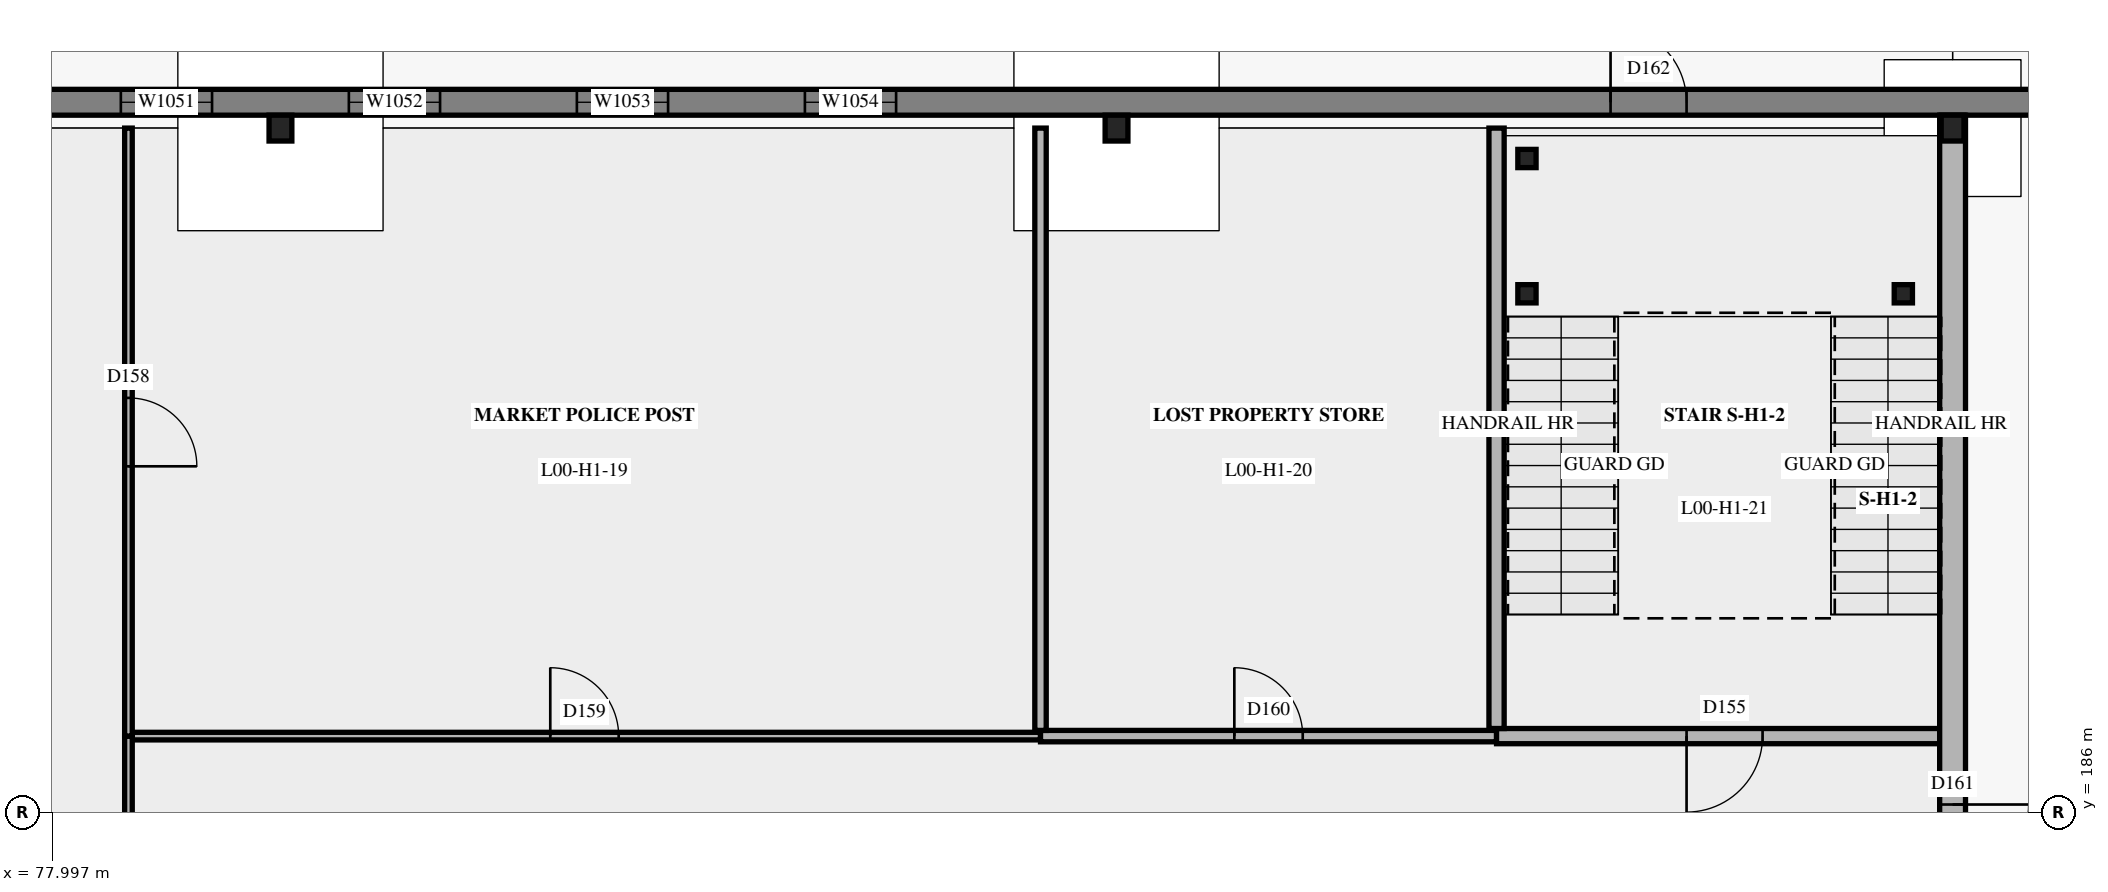
"""IFC4 building model, lengths in metres.
Left out: names, types, materials, properties, quantities, classifications, styles, units other than length and angle.
Written with IfcOpenShell. Run it as: python <this file> out.ifc"""

import sys

from ifc_helpers import new_model, si_unit, direction, frame, frame_2d, origin, origin_2d, place, context, subcontext, project, spatial, rectangle, i_section, extrude, element, fill, save


model = new_model("IFC4")
c1 = context("Model", 3, precision=1e-05, world=origin(), true_north=direction((0.0, 1.0)))
c2 = subcontext(c1, "Body", "Model", "MODEL_VIEW")
j1 = project(units=[si_unit("LENGTHUNIT", "METRE"), si_unit("PLANEANGLEUNIT", "RADIAN")], contexts=[c1])
p1 = place(None, origin())
s1 = spatial("IfcSite", under=j1, at=p1, CompositionType="ELEMENT")
p2 = place(p1, origin())
s2 = spatial("IfcBuilding", under=s1, at=p2, CompositionType="ELEMENT")
p3 = place(p2, origin())
s3 = spatial("IfcBuildingStorey", under=s2, at=p3, CompositionType="ELEMENT", Elevation=0.0)
for number, where, z_axis, x_axis in (
    (1, (81.0, 195.0, 0.0), (0.0, 0.0, 1.0), (1.0, 0.0, 0.0)),
    (2, (92.0, 195.0, 0.0), (0.0, 0.0, 1.0), (1.0, 0.0, 0.0)),
    (3, (103.0, 195.0, 0.0), (0.0, 0.0, 1.0), (1.0, 0.0, 0.0)),
):
    element("IfcColumn", number, at=place(p3, frame(where, z_axis=z_axis, x_axis=x_axis)), inside=s3, PredefinedType="COLUMN", context=c2, shape_type="SweptSolid", body=[
        extrude(i_section(OverallWidth=0.3, OverallDepth=0.34, WebThickness=0.012, FlangeThickness=0.021, at=origin_2d()), origin(), (0.0, 0.0, 1.0), 4.65),
    ])
p4 = place(p3, frame((30.0, 195.34, 0.0), z_axis=(0.0, 0.0, 1.0), x_axis=(1.0, 0.0, 0.0)))
e4 = element("IfcWall", 4, at=p4, inside=s3, PredefinedType="SOLIDWALL", context=c2, shape_type="SweptSolid", body=[
    extrude(rectangle(XDim=80.0, YDim=0.34, at=frame_2d((40.0, 0.0))), origin(), (0.0, 0.0, 1.0), 5.4),
])
p5 = place(p4, frame((42.5, 0.0, 0.0)))
e5 = element("IfcOpeningElement", 5, at=p5, cuts=e4, PredefinedType="OPENING", context=c2, shape_type="SweptSolid", body=[
    extrude(rectangle(XDim=1.8, YDim=2.1, at=frame_2d((0.9, 1.05))), frame((0.0, 0.18, 0.0), z_axis=(0.0, -1.0, 0.0), x_axis=(1.0, 0.0, 0.0)), (0.0, 0.0, 1.0), 0.36),
])
p6 = place(p4, frame((34.5, 0.0, 0.0)))
e6 = element("IfcOpeningElement", 6, at=p6, cuts=e4, PredefinedType="OPENING", context=c2, shape_type="SweptSolid", body=[
    extrude(rectangle(XDim=1.0, YDim=2.1, at=frame_2d((0.5, 1.05))), frame((0.0, 0.18, 0.0), z_axis=(0.0, -1.0, 0.0), x_axis=(1.0, 0.0, 0.0)), (0.0, 0.0, 1.0), 0.36),
])
p7 = place(p4, frame((68.5, 0.0, 0.0)))
e7 = element("IfcOpeningElement", 7, at=p7, cuts=e4, PredefinedType="OPENING", context=c2, shape_type="SweptSolid", body=[
    extrude(rectangle(XDim=1.0, YDim=2.1, at=frame_2d((0.5, 1.05))), frame((0.0, 0.18, 0.0), z_axis=(0.0, -1.0, 0.0), x_axis=(1.0, 0.0, 0.0)), (0.0, 0.0, 1.0), 0.36),
])
p8 = place(p4, frame((0.9, 0.0, 0.9)))
e8 = element("IfcOpeningElement", 8, at=p8, cuts=e4, PredefinedType="OPENING", context=c2, shape_type="SweptSolid", body=[
    extrude(rectangle(XDim=1.2, YDim=3.3, at=frame_2d((0.6, 1.65))), frame((0.0, 0.18, 0.0), z_axis=(0.0, -1.0, 0.0), x_axis=(1.0, 0.0, 0.0)), (0.0, 0.0, 1.0), 0.36),
])
p9 = place(p4, frame((3.9, 0.0, 0.9)))
e9 = element("IfcOpeningElement", 9, at=p9, cuts=e4, PredefinedType="OPENING", context=c2, shape_type="SweptSolid", body=[
    extrude(rectangle(XDim=1.2, YDim=3.3, at=frame_2d((0.6, 1.65))), frame((0.0, 0.18, 0.0), z_axis=(0.0, -1.0, 0.0), x_axis=(1.0, 0.0, 0.0)), (0.0, 0.0, 1.0), 0.36),
])
p10 = place(p4, frame((18.9, 0.0, 0.9)))
e10 = element("IfcOpeningElement", 10, at=p10, cuts=e4, PredefinedType="OPENING", context=c2, shape_type="SweptSolid", body=[
    extrude(rectangle(XDim=1.2, YDim=3.3, at=frame_2d((0.6, 1.65))), frame((0.0, 0.18, 0.0), z_axis=(0.0, -1.0, 0.0), x_axis=(1.0, 0.0, 0.0)), (0.0, 0.0, 1.0), 0.36),
])
p11 = place(p4, frame((21.9, 0.0, 0.9)))
e11 = element("IfcOpeningElement", 11, at=p11, cuts=e4, PredefinedType="OPENING", context=c2, shape_type="SweptSolid", body=[
    extrude(rectangle(XDim=1.2, YDim=3.3, at=frame_2d((0.6, 1.65))), frame((0.0, 0.18, 0.0), z_axis=(0.0, -1.0, 0.0), x_axis=(1.0, 0.0, 0.0)), (0.0, 0.0, 1.0), 0.36),
])
p12 = place(p4, frame((24.9, 0.0, 0.9)))
e12 = element("IfcOpeningElement", 12, at=p12, cuts=e4, PredefinedType="OPENING", context=c2, shape_type="SweptSolid", body=[
    extrude(rectangle(XDim=1.2, YDim=3.3, at=frame_2d((0.6, 1.65))), frame((0.0, 0.18, 0.0), z_axis=(0.0, -1.0, 0.0), x_axis=(1.0, 0.0, 0.0)), (0.0, 0.0, 1.0), 0.36),
])
p13 = place(p4, frame((30.9, 0.0, 0.9)))
e13 = element("IfcOpeningElement", 13, at=p13, cuts=e4, PredefinedType="OPENING", context=c2, shape_type="SweptSolid", body=[
    extrude(rectangle(XDim=1.2, YDim=3.3, at=frame_2d((0.6, 1.65))), frame((0.0, 0.18, 0.0), z_axis=(0.0, -1.0, 0.0), x_axis=(1.0, 0.0, 0.0)), (0.0, 0.0, 1.0), 0.36),
])
p14 = place(p4, frame((36.9, 0.0, 0.9)))
e14 = element("IfcOpeningElement", 14, at=p14, cuts=e4, PredefinedType="OPENING", context=c2, shape_type="SweptSolid", body=[
    extrude(rectangle(XDim=1.2, YDim=3.3, at=frame_2d((0.6, 1.65))), frame((0.0, 0.18, 0.0), z_axis=(0.0, -1.0, 0.0), x_axis=(1.0, 0.0, 0.0)), (0.0, 0.0, 1.0), 0.36),
])
p15 = place(p4, frame((45.9, 0.0, 0.9)))
e15 = element("IfcOpeningElement", 15, at=p15, cuts=e4, PredefinedType="OPENING", context=c2, shape_type="SweptSolid", body=[
    extrude(rectangle(XDim=1.2, YDim=3.3, at=frame_2d((0.6, 1.65))), frame((0.0, 0.18, 0.0), z_axis=(0.0, -1.0, 0.0), x_axis=(1.0, 0.0, 0.0)), (0.0, 0.0, 1.0), 0.36),
])
p16 = place(p4, frame((48.9, 0.0, 0.9)))
e16 = element("IfcOpeningElement", 16, at=p16, cuts=e4, PredefinedType="OPENING", context=c2, shape_type="SweptSolid", body=[
    extrude(rectangle(XDim=1.2, YDim=3.3, at=frame_2d((0.6, 1.65))), frame((0.0, 0.18, 0.0), z_axis=(0.0, -1.0, 0.0), x_axis=(1.0, 0.0, 0.0)), (0.0, 0.0, 1.0), 0.36),
])
p17 = place(p4, frame((51.9, 0.0, 0.9)))
e17 = element("IfcOpeningElement", 17, at=p17, cuts=e4, PredefinedType="OPENING", context=c2, shape_type="SweptSolid", body=[
    extrude(rectangle(XDim=1.2, YDim=3.3, at=frame_2d((0.6, 1.65))), frame((0.0, 0.18, 0.0), z_axis=(0.0, -1.0, 0.0), x_axis=(1.0, 0.0, 0.0)), (0.0, 0.0, 1.0), 0.36),
])
p18 = place(p4, frame((54.9, 0.0, 0.9)))
e18 = element("IfcOpeningElement", 18, at=p18, cuts=e4, PredefinedType="OPENING", context=c2, shape_type="SweptSolid", body=[
    extrude(rectangle(XDim=1.2, YDim=3.3, at=frame_2d((0.6, 1.65))), frame((0.0, 0.18, 0.0), z_axis=(0.0, -1.0, 0.0), x_axis=(1.0, 0.0, 0.0)), (0.0, 0.0, 1.0), 0.36),
])
p19 = place(p4, frame((57.9, 0.0, 0.9)))
e19 = element("IfcOpeningElement", 19, at=p19, cuts=e4, PredefinedType="OPENING", context=c2, shape_type="SweptSolid", body=[
    extrude(rectangle(XDim=1.2, YDim=3.3, at=frame_2d((0.6, 1.65))), frame((0.0, 0.18, 0.0), z_axis=(0.0, -1.0, 0.0), x_axis=(1.0, 0.0, 0.0)), (0.0, 0.0, 1.0), 0.36),
])
p20 = place(p4, frame((75.9, 0.0, 0.9)))
e20 = element("IfcOpeningElement", 20, at=p20, cuts=e4, PredefinedType="OPENING", context=c2, shape_type="SweptSolid", body=[
    extrude(rectangle(XDim=1.2, YDim=3.3, at=frame_2d((0.6, 1.65))), frame((0.0, 0.18, 0.0), z_axis=(0.0, -1.0, 0.0), x_axis=(1.0, 0.0, 0.0)), (0.0, 0.0, 1.0), 0.36),
])
p21 = place(p3, frame((79.05, 187.0, 0.0), z_axis=(0.0, 0.0, 1.0), x_axis=(1.0, 0.0, 0.0)))
e21 = element("IfcWall", 21, at=p21, inside=s3, PredefinedType="PARTITIONING", context=c2, shape_type="SweptSolid", body=[
    extrude(rectangle(XDim=11.95, YDim=0.1, at=frame_2d((5.975, 0.0))), origin(), (0.0, 0.0, 1.0), 5.15),
])
p22 = place(p21, frame((5.5, 0.0, 0.0)))
e22 = element("IfcOpeningElement", 22, at=p22, cuts=e21, PredefinedType="OPENING", context=c2, shape_type="SweptSolid", body=[
    extrude(rectangle(XDim=0.9, YDim=2.1, at=frame_2d((0.45, 1.05))), frame((0.0, 0.06, 0.0), z_axis=(0.0, -1.0, 0.0), x_axis=(1.0, 0.0, 0.0)), (0.0, 0.0, 1.0), 0.12),
])
p23 = place(p3, frame((91.0, 187.0, 0.0), z_axis=(0.0, 0.0, 1.0), x_axis=(1.0, 0.0, 0.0)))
e23 = element("IfcWall", 23, at=p23, inside=s3, PredefinedType="PARTITIONING", context=c2, shape_type="SweptSolid", body=[
    extrude(rectangle(XDim=6.0, YDim=0.15, at=frame_2d((3.0, 0.0))), origin(), (0.0, 0.0, 1.0), 5.15),
])
p24 = place(p23, frame((2.55, 0.0, 0.0)))
e24 = element("IfcOpeningElement", 24, at=p24, cuts=e23, PredefinedType="OPENING", context=c2, shape_type="SweptSolid", body=[
    extrude(rectangle(XDim=0.9, YDim=2.1, at=frame_2d((0.45, 1.05))), frame((0.0, 0.085, 0.0), z_axis=(0.0, -1.0, 0.0), x_axis=(1.0, 0.0, 0.0)), (0.0, 0.0, 1.0), 0.17),
])
p25 = place(p3, frame((97.0, 187.0, 0.0), z_axis=(0.0, 0.0, 1.0), x_axis=(1.0, 0.0, 0.0)))
e25 = element("IfcWall", 25, at=p25, inside=s3, PredefinedType="PARTITIONING", context=c2, shape_type="SweptSolid", body=[
    extrude(rectangle(XDim=6.0, YDim=0.2, at=frame_2d((3.0, 0.0))), origin(), (0.0, 0.0, 1.0), 5.15),
])
p26 = place(p25, frame((2.5, 0.0, 0.0)))
e26 = element("IfcOpeningElement", 26, at=p26, cuts=e25, PredefinedType="OPENING", context=c2, shape_type="SweptSolid", body=[
    extrude(rectangle(XDim=1.0, YDim=2.1, at=frame_2d((0.5, 1.05))), frame((0.0, 0.11, 0.0), z_axis=(0.0, -1.0, 0.0), x_axis=(1.0, 0.0, 0.0)), (0.0, 0.0, 1.0), 0.22),
])
p27 = place(p3, frame((79.0, 181.0, 0.0), z_axis=(0.0, 0.0, 1.0), x_axis=(0.0, 1.0, 0.0)))
e27 = element("IfcWall", 27, at=p27, inside=s3, PredefinedType="PARTITIONING", context=c2, shape_type="SweptSolid", body=[
    extrude(rectangle(XDim=6.0, YDim=0.1, at=frame_2d((3.0, 0.0))), origin(), (0.0, 0.0, 1.0), 5.15),
])
p28 = place(p27, frame((2.1, 0.0, 0.0)))
e28 = element("IfcOpeningElement", 28, at=p28, cuts=e27, PredefinedType="OPENING", context=c2, shape_type="SweptSolid", body=[
    extrude(rectangle(XDim=1.8, YDim=2.1, at=frame_2d((0.9, 1.05))), frame((0.0, 0.06, 0.0), z_axis=(0.0, -1.0, 0.0), x_axis=(1.0, 0.0, 0.0)), (0.0, 0.0, 1.0), 0.12),
])
p29 = place(p3, frame((79.0, 187.0, 0.0), z_axis=(0.0, 0.0, 1.0), x_axis=(0.0, 1.0, 0.0)))
e29 = element("IfcWall", 29, at=p29, inside=s3, PredefinedType="PARTITIONING", context=c2, shape_type="SweptSolid", body=[
    extrude(rectangle(XDim=8.0, YDim=0.1, at=frame_2d((4.0, 0.0))), origin(), (0.0, 0.0, 1.0), 5.15),
])
p30 = place(p29, frame((3.55, 0.0, 0.0)))
e30 = element("IfcOpeningElement", 30, at=p30, cuts=e29, PredefinedType="OPENING", context=c2, shape_type="SweptSolid", body=[
    extrude(rectangle(XDim=0.9, YDim=2.1, at=frame_2d((0.45, 1.05))), frame((0.0, 0.06, 0.0), z_axis=(0.0, -1.0, 0.0), x_axis=(1.0, 0.0, 0.0)), (0.0, 0.0, 1.0), 0.12),
])
p31 = place(p3, frame((91.0, 187.075, 0.0), z_axis=(0.0, 0.0, 1.0), x_axis=(0.0, 1.0, 0.0)))
e31 = element("IfcWall", 31, at=p31, inside=s3, PredefinedType="PARTITIONING", context=c2, shape_type="SweptSolid", body=[
    extrude(rectangle(XDim=7.925, YDim=0.15, at=frame_2d((3.962, 0.0))), origin(), (0.0, 0.0, 1.0), 5.15),
])
p32 = place(p3, frame((97.0, 187.1, 0.0), z_axis=(0.0, 0.0, 1.0), x_axis=(0.0, 1.0, 0.0)))
e32 = element("IfcWall", 32, at=p32, inside=s3, PredefinedType="PARTITIONING", context=c2, shape_type="SweptSolid", body=[
    extrude(rectangle(XDim=7.9, YDim=0.2, at=frame_2d((3.95, 0.0))), origin(), (0.0, 0.0, 1.0), 5.15),
])
p33 = place(p3, frame((103.0, 171.0, 0.0), z_axis=(0.0, 0.0, 1.0), x_axis=(0.0, 1.0, 0.0)))
e33 = element("IfcWall", 33, at=p33, inside=s3, PredefinedType="SOLIDWALL", context=c2, shape_type="SweptSolid", body=[
    extrude(rectangle(XDim=24.17, YDim=0.34, at=frame_2d((12.085, 0.0))), origin(), (0.0, 0.0, 1.0), 4.65),
])
p34 = place(p33, frame((15.1, 0.0, 0.0), z_axis=(0.0, 0.0, 1.0), x_axis=(-1.0, 0.0, 0.0)))
e34 = element("IfcOpeningElement", 34, at=p34, cuts=e33, PredefinedType="OPENING", context=c2, shape_type="SweptSolid", body=[
    extrude(rectangle(XDim=1.0, YDim=2.1, at=frame_2d((0.5, 1.05))), frame((0.0, 0.18, 0.0), z_axis=(0.0, -1.0, 0.0), x_axis=(1.0, 0.0, 0.0)), (0.0, 0.0, 1.0), 0.36),
])
for number, where, z_axis, x_axis in (
    (35, (97.4, 192.82, 0.0), (0.0, 0.0, 1.0), (1.0, 0.0, 0.0)),
    (36, (97.4, 194.6, 0.0), (0.0, 0.0, 1.0), (1.0, 0.0, 0.0)),
    (37, (102.352, 192.82, 0.0), (0.0, 0.0, 1.0), (1.0, 0.0, 0.0)),
):
    element("IfcColumn", number, at=place(p3, frame(where, z_axis=z_axis, x_axis=x_axis)), inside=s3, PredefinedType="COLUMN", context=c2, shape_type="SweptSolid", body=[
        extrude(i_section(OverallWidth=0.24, OverallDepth=0.24, WebThickness=0.01, FlangeThickness=0.017, at=origin_2d()), origin(), (0.0, 0.0, 1.0), 2.5),
    ])
p35 = place(p34, origin())
e38 = element("IfcDoor", 38, at=p35, inside=s3, OperationType="SINGLE_SWING_LEFT", PredefinedType="DOOR", context=c2, shape_type="SweptSolid", body=[
    extrude(rectangle(XDim=1.0, YDim=2.1, at=frame_2d((0.5, 1.05))), frame((0.0, 0.025, 0.0), z_axis=(0.0, -1.0, 0.0), x_axis=(1.0, 0.0, 0.0)), (0.0, 0.0, 1.0), 0.05),
])
fill(e34, e38)
p36 = place(p7, origin())
e39 = element("IfcDoor", 39, at=p36, inside=s3, OperationType="SINGLE_SWING_LEFT", PredefinedType="DOOR", context=c2, shape_type="SweptSolid", body=[
    extrude(rectangle(XDim=1.0, YDim=2.1, at=frame_2d((0.5, 1.05))), frame((0.0, 0.025, 0.0), z_axis=(0.0, -1.0, 0.0), x_axis=(1.0, 0.0, 0.0)), (0.0, 0.0, 1.0), 0.05),
])
fill(e7, e39)
p37 = place(p16, origin())
e40 = element("IfcWindow", 40, at=p37, inside=s3, PartitioningType="SINGLE_PANEL", PredefinedType="WINDOW", context=c2, shape_type="SweptSolid", body=[
    extrude(rectangle(XDim=1.2, YDim=3.3, at=frame_2d((0.6, 1.65))), frame((0.0, 0.03, 0.0), z_axis=(0.0, -1.0, 0.0), x_axis=(1.0, 0.0, 0.0)), (0.0, 0.0, 1.0), 0.06),
])
fill(e16, e40)
p38 = place(p17, origin())
e41 = element("IfcWindow", 41, at=p38, inside=s3, PartitioningType="SINGLE_PANEL", PredefinedType="WINDOW", context=c2, shape_type="SweptSolid", body=[
    extrude(rectangle(XDim=1.2, YDim=3.3, at=frame_2d((0.6, 1.65))), frame((0.0, 0.03, 0.0), z_axis=(0.0, -1.0, 0.0), x_axis=(1.0, 0.0, 0.0)), (0.0, 0.0, 1.0), 0.06),
])
fill(e17, e41)
p39 = place(p18, origin())
e42 = element("IfcWindow", 42, at=p39, inside=s3, PartitioningType="SINGLE_PANEL", PredefinedType="WINDOW", context=c2, shape_type="SweptSolid", body=[
    extrude(rectangle(XDim=1.2, YDim=3.3, at=frame_2d((0.6, 1.65))), frame((0.0, 0.03, 0.0), z_axis=(0.0, -1.0, 0.0), x_axis=(1.0, 0.0, 0.0)), (0.0, 0.0, 1.0), 0.06),
])
fill(e18, e42)
p40 = place(p19, origin())
e43 = element("IfcWindow", 43, at=p40, inside=s3, PartitioningType="SINGLE_PANEL", PredefinedType="WINDOW", context=c2, shape_type="SweptSolid", body=[
    extrude(rectangle(XDim=1.2, YDim=3.3, at=frame_2d((0.6, 1.65))), frame((0.0, 0.03, 0.0), z_axis=(0.0, -1.0, 0.0), x_axis=(1.0, 0.0, 0.0)), (0.0, 0.0, 1.0), 0.06),
])
fill(e19, e43)
p41 = place(p26, origin())
e44 = element("IfcDoor", 44, at=p41, inside=s3, OperationType="SINGLE_SWING_RIGHT", PredefinedType="DOOR", context=c2, shape_type="SweptSolid", body=[
    extrude(rectangle(XDim=1.0, YDim=2.1, at=frame_2d((0.5, 1.05))), frame((0.0, 0.025, 0.0), z_axis=(0.0, -1.0, 0.0), x_axis=(1.0, 0.0, 0.0)), (0.0, 0.0, 1.0), 0.05),
])
fill(e26, e44)
p42 = place(p30, origin())
e45 = element("IfcDoor", 45, at=p42, inside=s3, OperationType="SINGLE_SWING_RIGHT", PredefinedType="DOOR", context=c2, shape_type="SweptSolid", body=[
    extrude(rectangle(XDim=0.9, YDim=2.1, at=frame_2d((0.45, 1.05))), frame((0.0, 0.025, 0.0), z_axis=(0.0, -1.0, 0.0), x_axis=(1.0, 0.0, 0.0)), (0.0, 0.0, 1.0), 0.05),
])
fill(e30, e45)
p43 = place(p22, origin())
e46 = element("IfcDoor", 46, at=p43, inside=s3, OperationType="SINGLE_SWING_LEFT", PredefinedType="DOOR", context=c2, shape_type="SweptSolid", body=[
    extrude(rectangle(XDim=0.9, YDim=2.1, at=frame_2d((0.45, 1.05))), frame((0.0, 0.025, 0.0), z_axis=(0.0, -1.0, 0.0), x_axis=(1.0, 0.0, 0.0)), (0.0, 0.0, 1.0), 0.05),
])
fill(e22, e46)
p44 = place(p24, origin())
e47 = element("IfcDoor", 47, at=p44, inside=s3, OperationType="SINGLE_SWING_LEFT", PredefinedType="DOOR", context=c2, shape_type="SweptSolid", body=[
    extrude(rectangle(XDim=0.9, YDim=2.1, at=frame_2d((0.45, 1.05))), frame((0.0, 0.025, 0.0), z_axis=(0.0, -1.0, 0.0), x_axis=(1.0, 0.0, 0.0)), (0.0, 0.0, 1.0), 0.05),
])
fill(e24, e47)
save(model, sys.argv[1])
